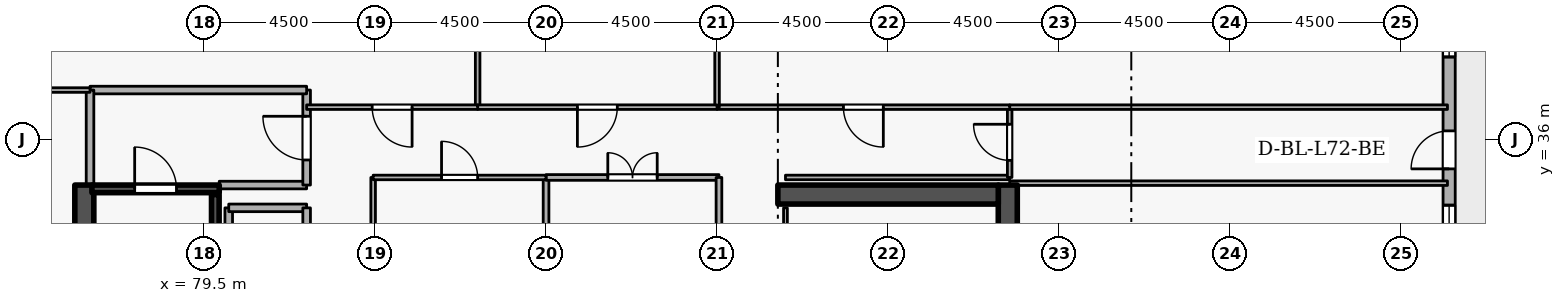
"""IFC4 building model, lengths in metres.
Left out: names, types, materials, properties, quantities, classifications, styles, units other than length and angle.
Written with IfcOpenShell. Run it as: python <this file> out.ifc"""

import sys

from ifc_helpers import new_model, si_unit, direction, frame, frame_2d, origin, place, context, subcontext, project, spatial, rectangle, extrude, element, fill, save


model = new_model("IFC4")
c1 = context("Model", 3, precision=1e-05, world=origin(), true_north=direction((0.0, 1.0)))
c2 = subcontext(c1, "Body", "Model", "MODEL_VIEW")
j1 = project(units=[si_unit("LENGTHUNIT", "METRE"), si_unit("PLANEANGLEUNIT", "RADIAN")], contexts=[c1])
p1 = place(None, origin())
s1 = spatial("IfcSite", under=j1, at=p1, CompositionType="ELEMENT")
p2 = place(p1, origin())
s2 = spatial("IfcBuilding", under=s1, at=p2, CompositionType="ELEMENT")
p3 = place(p2, frame((0.0, 0.0, 269.1)))
s3 = spatial("IfcBuildingStorey", under=s2, at=p3, CompositionType="ELEMENT", Elevation=269.1)
p4 = place(p3, frame((100.65, 19.2, 0.0), z_axis=(0.0, 0.0, 1.0), x_axis=(0.0, 1.0, 0.0)))
e1 = element("IfcWall", 1, at=p4, inside=s3, PredefinedType="SHEAR", context=c2, shape_type="SweptSolid", body=[
    extrude(rectangle(XDim=15.6, YDim=0.5, at=frame_2d((7.8, 0.0))), origin(), (0.0, 0.0, 1.0), 3.6),
])
p5 = place(p3, frame((94.6, 34.55, 0.0), z_axis=(0.0, 0.0, 1.0), x_axis=(1.0, 0.0, 0.0)))
e2 = element("IfcWall", 2, at=p5, inside=s3, PredefinedType="SHEAR", context=c2, shape_type="SweptSolid", body=[
    extrude(rectangle(XDim=5.8, YDim=0.5, at=frame_2d((2.9, 0.0))), origin(), (0.0, 0.0, 1.0), 3.6),
])
p6 = place(p3, frame((76.35, 19.2, 0.0), z_axis=(0.0, 0.0, 1.0), x_axis=(0.0, 1.0, 0.0)))
e3 = element("IfcWall", 3, at=p6, inside=s3, PredefinedType="SHEAR", context=c2, shape_type="SweptSolid", body=[
    extrude(rectangle(XDim=15.6, YDim=0.5, at=frame_2d((7.8, 0.0))), origin(), (0.0, 0.0, 1.0), 3.6),
])
p7 = place(p3, frame((112.263, 12.371, 0.0), z_axis=(0.0, 0.0, 1.0), x_axis=(5.4540124e-05, 0.999999998513, 0.0)))
e4 = element("IfcWall", 4, at=p7, inside=s3, PredefinedType="STANDARD", context=c2, shape_type="SweptSolid", body=[
    extrude(rectangle(XDim=35.811, YDim=0.32, at=frame_2d((17.905, 0.0))), origin(), (0.0, 0.0, 1.0), 2.7),
])
p8 = place(p7, frame((22.855, 0.0, 0.0)))
e5 = element("IfcOpeningElement", 5, at=p8, cuts=e4, PredefinedType="OPENING", context=c2, shape_type="SweptSolid", body=[
    extrude(rectangle(XDim=1.0, YDim=2.08, at=frame_2d((0.5, 1.04))), frame((0.0, 0.17, 0.0), z_axis=(0.0, -1.0, 0.0), x_axis=(1.0, 0.0, 0.0)), (0.0, 0.0, 1.0), 0.34),
])
p9 = place(p7, frame((1.8, 0.0, 0.72)))
e6 = element("IfcOpeningElement", 6, at=p9, cuts=e4, PredefinedType="OPENING", context=c2, shape_type="SweptSolid", body=[
    extrude(rectangle(XDim=0.9, YDim=1.75, at=frame_2d((0.45, 0.875))), frame((0.0, 0.17, 0.0), z_axis=(0.0, -1.0, 0.0), x_axis=(1.0, 0.0, 0.0)), (0.0, 0.0, 1.0), 0.34),
])
p10 = place(p7, frame((6.6, 0.0, 0.72)))
e7 = element("IfcOpeningElement", 7, at=p10, cuts=e4, PredefinedType="OPENING", context=c2, shape_type="SweptSolid", body=[
    extrude(rectangle(XDim=0.9, YDim=1.75, at=frame_2d((0.45, 0.875))), frame((0.0, 0.17, 0.0), z_axis=(0.0, -1.0, 0.0), x_axis=(1.0, 0.0, 0.0)), (0.0, 0.0, 1.0), 0.34),
])
p11 = place(p7, frame((11.4, 0.0, 0.72)))
e8 = element("IfcOpeningElement", 8, at=p11, cuts=e4, PredefinedType="OPENING", context=c2, shape_type="SweptSolid", body=[
    extrude(rectangle(XDim=0.9, YDim=1.75, at=frame_2d((0.45, 0.875))), frame((0.0, 0.17, 0.0), z_axis=(0.0, -1.0, 0.0), x_axis=(1.0, 0.0, 0.0)), (0.0, 0.0, 1.0), 0.34),
])
p12 = place(p7, frame((16.2, 0.0, 0.72)))
e9 = element("IfcOpeningElement", 9, at=p12, cuts=e4, PredefinedType="OPENING", context=c2, shape_type="SweptSolid", body=[
    extrude(rectangle(XDim=0.9, YDim=1.75, at=frame_2d((0.45, 0.875))), frame((0.0, 0.17, 0.0), z_axis=(0.0, -1.0, 0.0), x_axis=(1.0, 0.0, 0.0)), (0.0, 0.0, 1.0), 0.34),
])
p13 = place(p7, frame((21.0, 0.0, 0.72)))
e10 = element("IfcOpeningElement", 10, at=p13, cuts=e4, PredefinedType="OPENING", context=c2, shape_type="SweptSolid", body=[
    extrude(rectangle(XDim=0.9, YDim=1.75, at=frame_2d((0.45, 0.875))), frame((0.0, 0.17, 0.0), z_axis=(0.0, -1.0, 0.0), x_axis=(1.0, 0.0, 0.0)), (0.0, 0.0, 1.0), 0.34),
])
p14 = place(p7, frame((25.8, 0.0, 0.72)))
e11 = element("IfcOpeningElement", 11, at=p14, cuts=e4, PredefinedType="OPENING", context=c2, shape_type="SweptSolid", body=[
    extrude(rectangle(XDim=0.9, YDim=1.75, at=frame_2d((0.45, 0.875))), frame((0.0, 0.17, 0.0), z_axis=(0.0, -1.0, 0.0), x_axis=(1.0, 0.0, 0.0)), (0.0, 0.0, 1.0), 0.34),
])
p15 = place(p7, frame((30.6, 0.0, 0.72)))
e12 = element("IfcOpeningElement", 12, at=p15, cuts=e4, PredefinedType="OPENING", context=c2, shape_type="SweptSolid", body=[
    extrude(rectangle(XDim=0.9, YDim=1.75, at=frame_2d((0.45, 0.875))), frame((0.0, 0.17, 0.0), z_axis=(0.0, -1.0, 0.0), x_axis=(1.0, 0.0, 0.0)), (0.0, 0.0, 1.0), 0.34),
])
p16 = place(p3, frame((76.55, 34.7, 0.0), z_axis=(0.0, 0.0, 1.0), x_axis=(1.0, 0.0, 0.0)))
e13 = element("IfcWall", 13, at=p16, inside=s3, PredefinedType="SHEAR", context=c2, shape_type="SweptSolid", body=[
    extrude(rectangle(XDim=3.35, YDim=0.2, at=frame_2d((1.675, 0.0))), origin(), (0.0, 0.0, 1.0), 3.6),
])
p17 = place(p16, frame((1.125, 0.0, 0.0)))
e14 = element("IfcOpeningElement", 14, at=p17, cuts=e13, PredefinedType="OPENING", context=c2, shape_type="SweptSolid", body=[
    extrude(rectangle(XDim=1.1, YDim=2.1, at=frame_2d((0.55, 1.05))), frame((0.0, 0.11, 0.0), z_axis=(0.0, -1.0, 0.0), x_axis=(1.0, 0.0, 0.0)), (0.0, 0.0, 1.0), 0.22),
])
p18 = place(p3, frame((79.797, 27.45, 0.0), z_axis=(0.0, 0.0, 1.0), x_axis=(0.0, 1.0, 0.0)))
e15 = element("IfcWall", 15, at=p18, inside=s3, PredefinedType="SHEAR", context=c2, shape_type="SweptSolid", body=[
    extrude(rectangle(XDim=7.1, YDim=0.2, at=frame_2d((3.55, 0.0))), origin(), (0.0, 0.0, 1.0), 3.6),
])
p19 = place(p3, frame((79.9, 34.8, 0.0), z_axis=(0.0, 0.0, 1.0), x_axis=(1.0, 0.0, 0.0)))
e16 = element("IfcWall", 16, at=p19, inside=s3, PredefinedType="STANDARD", context=c2, shape_type="SweptSolid", body=[
    extrude(rectangle(XDim=2.3, YDim=0.2, at=frame_2d((1.15, 0.0))), origin(), (0.0, 0.0, 1.0), 2.545),
])
p20 = place(p3, frame((82.2, 34.8, 0.0), z_axis=(0.0, 0.0, 1.0), x_axis=(0.0, 1.0, 0.0)))
e17 = element("IfcWall", 17, at=p20, inside=s3, PredefinedType="STANDARD", context=c2, shape_type="SweptSolid", body=[
    extrude(rectangle(XDim=2.5, YDim=0.2, at=frame_2d((1.25, 0.0))), origin(), (0.0, 0.0, 1.0), 3.34),
])
p21 = place(p20, frame((0.66, 0.0, 0.0)))
e18 = element("IfcOpeningElement", 18, at=p21, cuts=e17, PredefinedType="OPENING", context=c2, shape_type="SweptSolid", body=[
    extrude(rectangle(XDim=1.15, YDim=2.1, at=frame_2d((0.575, 1.05))), frame((0.0, 0.11, 0.0), z_axis=(0.0, -1.0, 0.0), x_axis=(1.0, 0.0, 0.0)), (0.0, 0.0, 1.0), 0.22),
])
p22 = place(p3, frame((82.2, 37.3, 0.0), z_axis=(0.0, 0.0, 1.0), x_axis=(-1.0, 0.0, 0.0)))
e19 = element("IfcWall", 19, at=p22, inside=s3, PredefinedType="STANDARD", context=c2, shape_type="SweptSolid", body=[
    extrude(rectangle(XDim=5.7, YDim=0.2, at=frame_2d((2.85, 0.0))), origin(), (0.0, 0.0, 1.0), 3.34),
])
p23 = place(p3, frame((76.5, 37.3, 0.0), z_axis=(0.0, 0.0, 1.0), x_axis=(0.0, -1.0, 0.0)))
e20 = element("IfcWall", 20, at=p23, inside=s3, PredefinedType="STANDARD", context=c2, shape_type="SweptSolid", body=[
    extrude(rectangle(XDim=2.5, YDim=0.2, at=frame_2d((1.25, 0.0))), origin(), (0.0, 0.0, 1.0), 3.34),
])
p24 = place(p3, frame((80.15, 31.85, 0.0), z_axis=(0.0, 0.0, 1.0), x_axis=(0.0, 1.0, 0.0)))
e21 = element("IfcWall", 21, at=p24, inside=s3, PredefinedType="STANDARD", context=c2, shape_type="SweptSolid", body=[
    extrude(rectangle(XDim=2.35, YDim=0.2, at=frame_2d((1.175, 0.0))), origin(), (0.0, 0.0, 1.0), 3.34),
])
p25 = place(p3, frame((80.15, 34.2, 0.0), z_axis=(0.0, 0.0, 1.0), x_axis=(1.0, 0.0, 0.0)))
e22 = element("IfcWall", 22, at=p25, inside=s3, PredefinedType="STANDARD", context=c2, shape_type="SweptSolid", body=[
    extrude(rectangle(XDim=2.05, YDim=0.2, at=frame_2d((1.025, 0.0))), origin(), (0.0, 0.0, 1.0), 2.545),
])
p26 = place(p3, frame((82.2, 34.2, 0.0), z_axis=(0.0, 0.0, 1.0), x_axis=(0.0, -1.0, 0.0)))
e23 = element("IfcWall", 23, at=p26, inside=s3, PredefinedType="STANDARD", context=c2, shape_type="SweptSolid", body=[
    extrude(rectangle(XDim=2.35, YDim=0.2, at=frame_2d((1.175, 0.0))), origin(), (0.0, 0.0, 1.0), 3.34),
])
p27 = place(p26, frame((0.6, 0.0, 0.0)))
e24 = element("IfcOpeningElement", 24, at=p27, cuts=e23, PredefinedType="OPENING", context=c2, shape_type="SweptSolid", body=[
    extrude(rectangle(XDim=1.15, YDim=2.1, at=frame_2d((0.575, 1.05))), frame((0.0, 0.11, 0.0), z_axis=(0.0, -1.0, 0.0), x_axis=(1.0, 0.0, 0.0)), (0.0, 0.0, 1.0), 0.22),
])
p28 = place(p3, frame((94.8, 32.05, 0.0), z_axis=(0.0, 0.0, 1.0), x_axis=(0.0, 1.0, 0.0)))
e25 = element("IfcWall", 25, at=p28, inside=s3, PredefinedType="PARTITIONING", context=c2, shape_type="SweptSolid", body=[
    extrude(rectangle(XDim=2.15, YDim=0.1, at=frame_2d((1.075, 0.0))), origin(), (0.0, 0.0, 1.0), 3.34),
])
p29 = place(p28, frame((0.6, 0.0, 0.0)))
e26 = element("IfcOpeningElement", 26, at=p29, cuts=e25, PredefinedType="OPENING", context=c2, shape_type="SweptSolid", body=[
    extrude(rectangle(XDim=0.95, YDim=2.1, at=frame_2d((0.475, 1.05))), frame((0.0, 0.06, 0.0), z_axis=(0.0, -1.0, 0.0), x_axis=(1.0, 0.0, 0.0)), (0.0, 0.0, 1.0), 0.12),
])
p30 = place(p3, frame((94.8, 35.0, 0.0), z_axis=(0.0, 0.0, 1.0), x_axis=(1.0, 0.0, 0.0)))
e27 = element("IfcWall", 27, at=p30, inside=s3, PredefinedType="PARTITIONING", context=c2, shape_type="SweptSolid", body=[
    extrude(rectangle(XDim=5.9, YDim=0.12, at=frame_2d((2.95, 0.0))), origin(), (0.0, 0.0, 1.0), 3.34),
])
p31 = place(p3, frame((100.7, 35.0, 0.0), z_axis=(0.0, 0.0, 1.0), x_axis=(0.0, 1.0, 0.0)))
e28 = element("IfcWall", 28, at=p31, inside=s3, PredefinedType="PARTITIONING", context=c2, shape_type="SweptSolid", body=[
    extrude(rectangle(XDim=1.85, YDim=0.12, at=frame_2d((0.925, 0.0))), origin(), (0.0, 0.0, 1.0), 3.34),
])
p32 = place(p31, frame((0.45, 0.0, 0.0)))
e29 = element("IfcOpeningElement", 29, at=p32, cuts=e28, PredefinedType="OPENING", context=c2, shape_type="SweptSolid", body=[
    extrude(rectangle(XDim=0.95, YDim=2.1, at=frame_2d((0.475, 1.05))), frame((0.0, 0.07, 0.0), z_axis=(0.0, -1.0, 0.0), x_axis=(1.0, 0.0, 0.0)), (0.0, 0.0, 1.0), 0.14),
])
for number, where, z_axis, x_axis in (
    (30, (100.7, 36.85, 0.0), (0.0, 0.0, 1.0), (1.0, 0.0, 0.0)),
    (31, (112.22, 34.85, 0.0), (0.0, 0.0, 1.0), (-1.0, 0.0, 0.0)),
):
    element("IfcWall", number, at=place(p3, frame(where, z_axis=z_axis, x_axis=x_axis)), inside=s3, PredefinedType="PARTITIONING", context=c2, shape_type="SweptSolid", body=[
        extrude(rectangle(XDim=11.52, YDim=0.12, at=frame_2d((5.76, 0.0))), origin(), (0.0, 0.0, 1.0), 3.34),
    ])
p33 = place(p3, frame((100.7, 36.85, 0.0), z_axis=(0.0, 0.0, 1.0), x_axis=(-1.0, 0.0, 0.0)))
e32 = element("IfcWall", 32, at=p33, inside=s3, PredefinedType="PARTITIONING", context=c2, shape_type="SweptSolid", body=[
    extrude(rectangle(XDim=7.7, YDim=0.12, at=frame_2d((3.85, 0.0))), origin(), (0.0, 0.0, 1.0), 3.34),
])
p34 = place(p33, frame((3.325, 0.0, 0.0)))
e33 = element("IfcOpeningElement", 33, at=p34, cuts=e32, PredefinedType="OPENING", context=c2, shape_type="SweptSolid", body=[
    extrude(rectangle(XDim=1.05, YDim=2.1, at=frame_2d((0.525, 1.05))), frame((0.0, 0.07, 0.0), z_axis=(0.0, -1.0, 0.0), x_axis=(1.0, 0.0, 0.0)), (0.0, 0.0, 1.0), 0.14),
])
for number, where, z_axis, x_axis in (
    (34, (93.0, 36.85, 0.0), (0.0, 0.0, 1.0), (0.0, 1.0, 0.0)),
    (35, (86.7, 36.85, 0.0), (0.0, 0.0, 1.0), (0.0, 1.0, 0.0)),
):
    element("IfcWall", number, at=place(p3, frame(where, z_axis=z_axis, x_axis=x_axis)), inside=s3, PredefinedType="PARTITIONING", context=c2, shape_type="SweptSolid", body=[
        extrude(rectangle(XDim=13.87, YDim=0.12, at=frame_2d((6.935, 0.0))), origin(), (0.0, 0.0, 1.0), 3.34),
    ])
p35 = place(p3, frame((93.0, 36.85, 0.0), z_axis=(0.0, 0.0, 1.0), x_axis=(-1.0, 0.0, 0.0)))
e36 = element("IfcWall", 36, at=p35, inside=s3, PredefinedType="PARTITIONING", context=c2, shape_type="SweptSolid", body=[
    extrude(rectangle(XDim=6.3, YDim=0.12, at=frame_2d((3.15, 0.0))), origin(), (0.0, 0.0, 1.0), 3.34),
])
p36 = place(p35, frame((2.625, 0.0, 0.0)))
e37 = element("IfcOpeningElement", 37, at=p36, cuts=e36, PredefinedType="OPENING", context=c2, shape_type="SweptSolid", body=[
    extrude(rectangle(XDim=1.05, YDim=2.1, at=frame_2d((0.525, 1.05))), frame((0.0, 0.07, 0.0), z_axis=(0.0, -1.0, 0.0), x_axis=(1.0, 0.0, 0.0)), (0.0, 0.0, 1.0), 0.14),
])
p37 = place(p3, frame((76.5, 37.3, 0.0), z_axis=(0.0, 0.0, 1.0), x_axis=(-1.0, 0.0, 0.0)))
e38 = element("IfcWall", 38, at=p37, inside=s3, PredefinedType="PARTITIONING", context=c2, shape_type="SweptSolid", body=[
    extrude(rectangle(XDim=5.72, YDim=0.12, at=frame_2d((2.86, 0.0))), origin(), (0.0, 0.0, 1.0), 3.34),
])
p38 = place(p3, frame((86.7, 36.85, 0.0), z_axis=(0.0, 0.0, 1.0), x_axis=(-1.0, 0.0, 0.0)))
e39 = element("IfcWall", 39, at=p38, inside=s3, PredefinedType="PARTITIONING", context=c2, shape_type="SweptSolid", body=[
    extrude(rectangle(XDim=4.5, YDim=0.12, at=frame_2d((2.25, 0.0))), origin(), (0.0, 0.0, 1.0), 3.34),
])
p39 = place(p38, frame((1.725, 0.0, 0.0)))
e40 = element("IfcOpeningElement", 40, at=p39, cuts=e39, PredefinedType="OPENING", context=c2, shape_type="SweptSolid", body=[
    extrude(rectangle(XDim=1.05, YDim=2.1, at=frame_2d((0.525, 1.05))), frame((0.0, 0.07, 0.0), z_axis=(0.0, -1.0, 0.0), x_axis=(1.0, 0.0, 0.0)), (0.0, 0.0, 1.0), 0.14),
])
p40 = place(p3, frame((88.5, 32.2, 0.0), z_axis=(0.0, 0.0, 1.0), x_axis=(0.0, 1.0, 0.0)))
e41 = element("IfcWall", 41, at=p40, inside=s3, PredefinedType="PARTITIONING", context=c2, shape_type="SweptSolid", body=[
    extrude(rectangle(XDim=2.8, YDim=0.15, at=frame_2d((1.4, 0.0))), origin(), (0.0, 0.0, 1.0), 3.34),
])
p41 = place(p3, frame((88.5, 35.0, 0.0), z_axis=(0.0, 0.0, 1.0), x_axis=(1.0, 0.0, 0.0)))
e42 = element("IfcWall", 42, at=p41, inside=s3, PredefinedType="PARTITIONING", context=c2, shape_type="SweptSolid", body=[
    extrude(rectangle(XDim=4.55, YDim=0.15, at=frame_2d((2.275, 0.0))), origin(), (0.0, 0.0, 1.0), 3.34),
])
p42 = place(p41, frame((1.625, 0.0, 0.0)))
e43 = element("IfcOpeningElement", 43, at=p42, cuts=e42, PredefinedType="OPENING", context=c2, shape_type="SweptSolid", body=[
    extrude(rectangle(XDim=1.3, YDim=2.12, at=frame_2d((0.65, 1.06))), frame((0.0, 0.085, 0.0), z_axis=(0.0, -1.0, 0.0), x_axis=(1.0, 0.0, 0.0)), (0.0, 0.0, 1.0), 0.17),
])
p43 = place(p3, frame((93.05, 35.0, 0.0), z_axis=(0.0, 0.0, 1.0), x_axis=(0.0, -1.0, 0.0)))
e44 = element("IfcWall", 44, at=p43, inside=s3, PredefinedType="PARTITIONING", context=c2, shape_type="SweptSolid", body=[
    extrude(rectangle(XDim=2.8, YDim=0.15, at=frame_2d((1.4, 0.0))), origin(), (0.0, 0.0, 1.0), 3.34),
])
p44 = place(p3, frame((83.95, 32.2, 0.0), z_axis=(0.0, 0.0, 1.0), x_axis=(0.0, 1.0, 0.0)))
e45 = element("IfcWall", 45, at=p44, inside=s3, PredefinedType="PARTITIONING", context=c2, shape_type="SweptSolid", body=[
    extrude(rectangle(XDim=2.8, YDim=0.12, at=frame_2d((1.4, 0.0))), origin(), (0.0, 0.0, 1.0), 3.34),
])
p45 = place(p3, frame((83.95, 35.0, 0.0), z_axis=(0.0, 0.0, 1.0), x_axis=(1.0, 0.0, 0.0)))
e46 = element("IfcWall", 46, at=p45, inside=s3, PredefinedType="PARTITIONING", context=c2, shape_type="SweptSolid", body=[
    extrude(rectangle(XDim=4.55, YDim=0.12, at=frame_2d((2.275, 0.0))), origin(), (0.0, 0.0, 1.0), 3.34),
])
p46 = place(p45, frame((1.8, 0.0, 0.0)))
e47 = element("IfcOpeningElement", 47, at=p46, cuts=e46, PredefinedType="OPENING", context=c2, shape_type="SweptSolid", body=[
    extrude(rectangle(XDim=0.95, YDim=2.1, at=frame_2d((0.475, 1.05))), frame((0.0, 0.07, 0.0), z_axis=(0.0, -1.0, 0.0), x_axis=(1.0, 0.0, 0.0)), (0.0, 0.0, 1.0), 0.14),
])
p47 = place(p8, origin())
e48 = element("IfcDoor", 48, at=p47, inside=s3, OperationType="SINGLE_SWING_LEFT", PredefinedType="DOOR", context=c2, shape_type="SweptSolid", body=[
    extrude(rectangle(XDim=1.0, YDim=2.08, at=frame_2d((0.5, 1.04))), frame((0.0, 0.025, 0.0), z_axis=(0.0, -1.0, 0.0), x_axis=(1.0, 0.0, 0.0)), (0.0, 0.0, 1.0), 0.05),
])
fill(e5, e48)
p48 = place(p13, origin())
e49 = element("IfcWindow", 49, at=p48, inside=s3, PartitioningType="SINGLE_PANEL", PredefinedType="WINDOW", context=c2, shape_type="SweptSolid", body=[
    extrude(rectangle(XDim=0.9, YDim=1.75, at=frame_2d((0.45, 0.875))), frame((0.0, 0.03, 0.0), z_axis=(0.0, -1.0, 0.0), x_axis=(1.0, 0.0, 0.0)), (0.0, 0.0, 1.0), 0.06),
])
fill(e10, e49)
p49 = place(p14, origin())
e50 = element("IfcWindow", 50, at=p49, inside=s3, PartitioningType="SINGLE_PANEL", PredefinedType="WINDOW", context=c2, shape_type="SweptSolid", body=[
    extrude(rectangle(XDim=0.9, YDim=1.75, at=frame_2d((0.45, 0.875))), frame((0.0, 0.03, 0.0), z_axis=(0.0, -1.0, 0.0), x_axis=(1.0, 0.0, 0.0)), (0.0, 0.0, 1.0), 0.06),
])
fill(e11, e50)
p50 = place(p17, origin())
e51 = element("IfcDoor", 51, at=p50, inside=s3, OperationType="SINGLE_SWING_LEFT", PredefinedType="DOOR", context=c2, shape_type="SweptSolid", body=[
    extrude(rectangle(XDim=1.1, YDim=2.1, at=frame_2d((0.55, 1.05))), frame((0.0, 0.025, 0.0), z_axis=(0.0, -1.0, 0.0), x_axis=(1.0, 0.0, 0.0)), (0.0, 0.0, 1.0), 0.05),
])
fill(e14, e51)
p51 = place(p21, origin())
e52 = element("IfcDoor", 52, at=p51, inside=s3, OperationType="SINGLE_SWING_RIGHT", PredefinedType="DOOR", context=c2, shape_type="SweptSolid", body=[
    extrude(rectangle(XDim=1.15, YDim=2.1, at=frame_2d((0.575, 1.05))), frame((0.0, 0.025, 0.0), z_axis=(0.0, -1.0, 0.0), x_axis=(1.0, 0.0, 0.0)), (0.0, 0.0, 1.0), 0.05),
])
fill(e18, e52)
p52 = place(p32, origin())
e53 = element("IfcDoor", 53, at=p52, inside=s3, OperationType="SINGLE_SWING_RIGHT", PredefinedType="DOOR", context=c2, shape_type="SweptSolid", body=[
    extrude(rectangle(XDim=0.95, YDim=2.1, at=frame_2d((0.475, 1.05))), frame((0.0, 0.025, 0.0), z_axis=(0.0, -1.0, 0.0), x_axis=(1.0, 0.0, 0.0)), (0.0, 0.0, 1.0), 0.05),
])
fill(e29, e53)
p53 = place(p34, origin())
e54 = element("IfcDoor", 54, at=p53, inside=s3, OperationType="SINGLE_SWING_LEFT", PredefinedType="DOOR", context=c2, shape_type="SweptSolid", body=[
    extrude(rectangle(XDim=1.05, YDim=2.1, at=frame_2d((0.525, 1.05))), frame((0.0, 0.025, 0.0), z_axis=(0.0, -1.0, 0.0), x_axis=(1.0, 0.0, 0.0)), (0.0, 0.0, 1.0), 0.05),
])
fill(e33, e54)
p54 = place(p36, origin())
e55 = element("IfcDoor", 55, at=p54, inside=s3, OperationType="SINGLE_SWING_RIGHT", PredefinedType="DOOR", context=c2, shape_type="SweptSolid", body=[
    extrude(rectangle(XDim=1.05, YDim=2.1, at=frame_2d((0.525, 1.05))), frame((0.0, 0.025, 0.0), z_axis=(0.0, -1.0, 0.0), x_axis=(1.0, 0.0, 0.0)), (0.0, 0.0, 1.0), 0.05),
])
fill(e37, e55)
p55 = place(p39, origin())
e56 = element("IfcDoor", 56, at=p55, inside=s3, OperationType="SINGLE_SWING_LEFT", PredefinedType="DOOR", context=c2, shape_type="SweptSolid", body=[
    extrude(rectangle(XDim=1.05, YDim=2.1, at=frame_2d((0.525, 1.05))), frame((0.0, 0.025, 0.0), z_axis=(0.0, -1.0, 0.0), x_axis=(1.0, 0.0, 0.0)), (0.0, 0.0, 1.0), 0.05),
])
fill(e40, e56)
p56 = place(p42, origin())
e57 = element("IfcDoor", 57, at=p56, inside=s3, OperationType="DOUBLE_DOOR_SINGLE_SWING", PredefinedType="DOOR", context=c2, shape_type="SweptSolid", body=[
    extrude(rectangle(XDim=1.3, YDim=2.12, at=frame_2d((0.65, 1.06))), frame((0.0, 0.025, 0.0), z_axis=(0.0, -1.0, 0.0), x_axis=(1.0, 0.0, 0.0)), (0.0, 0.0, 1.0), 0.05),
])
fill(e43, e57)
p57 = place(p46, origin())
e58 = element("IfcDoor", 58, at=p57, inside=s3, OperationType="SINGLE_SWING_LEFT", PredefinedType="DOOR", context=c2, shape_type="SweptSolid", body=[
    extrude(rectangle(XDim=0.95, YDim=2.1, at=frame_2d((0.475, 1.05))), frame((0.0, 0.025, 0.0), z_axis=(0.0, -1.0, 0.0), x_axis=(1.0, 0.0, 0.0)), (0.0, 0.0, 1.0), 0.05),
])
fill(e47, e58)
save(model, sys.argv[1])
